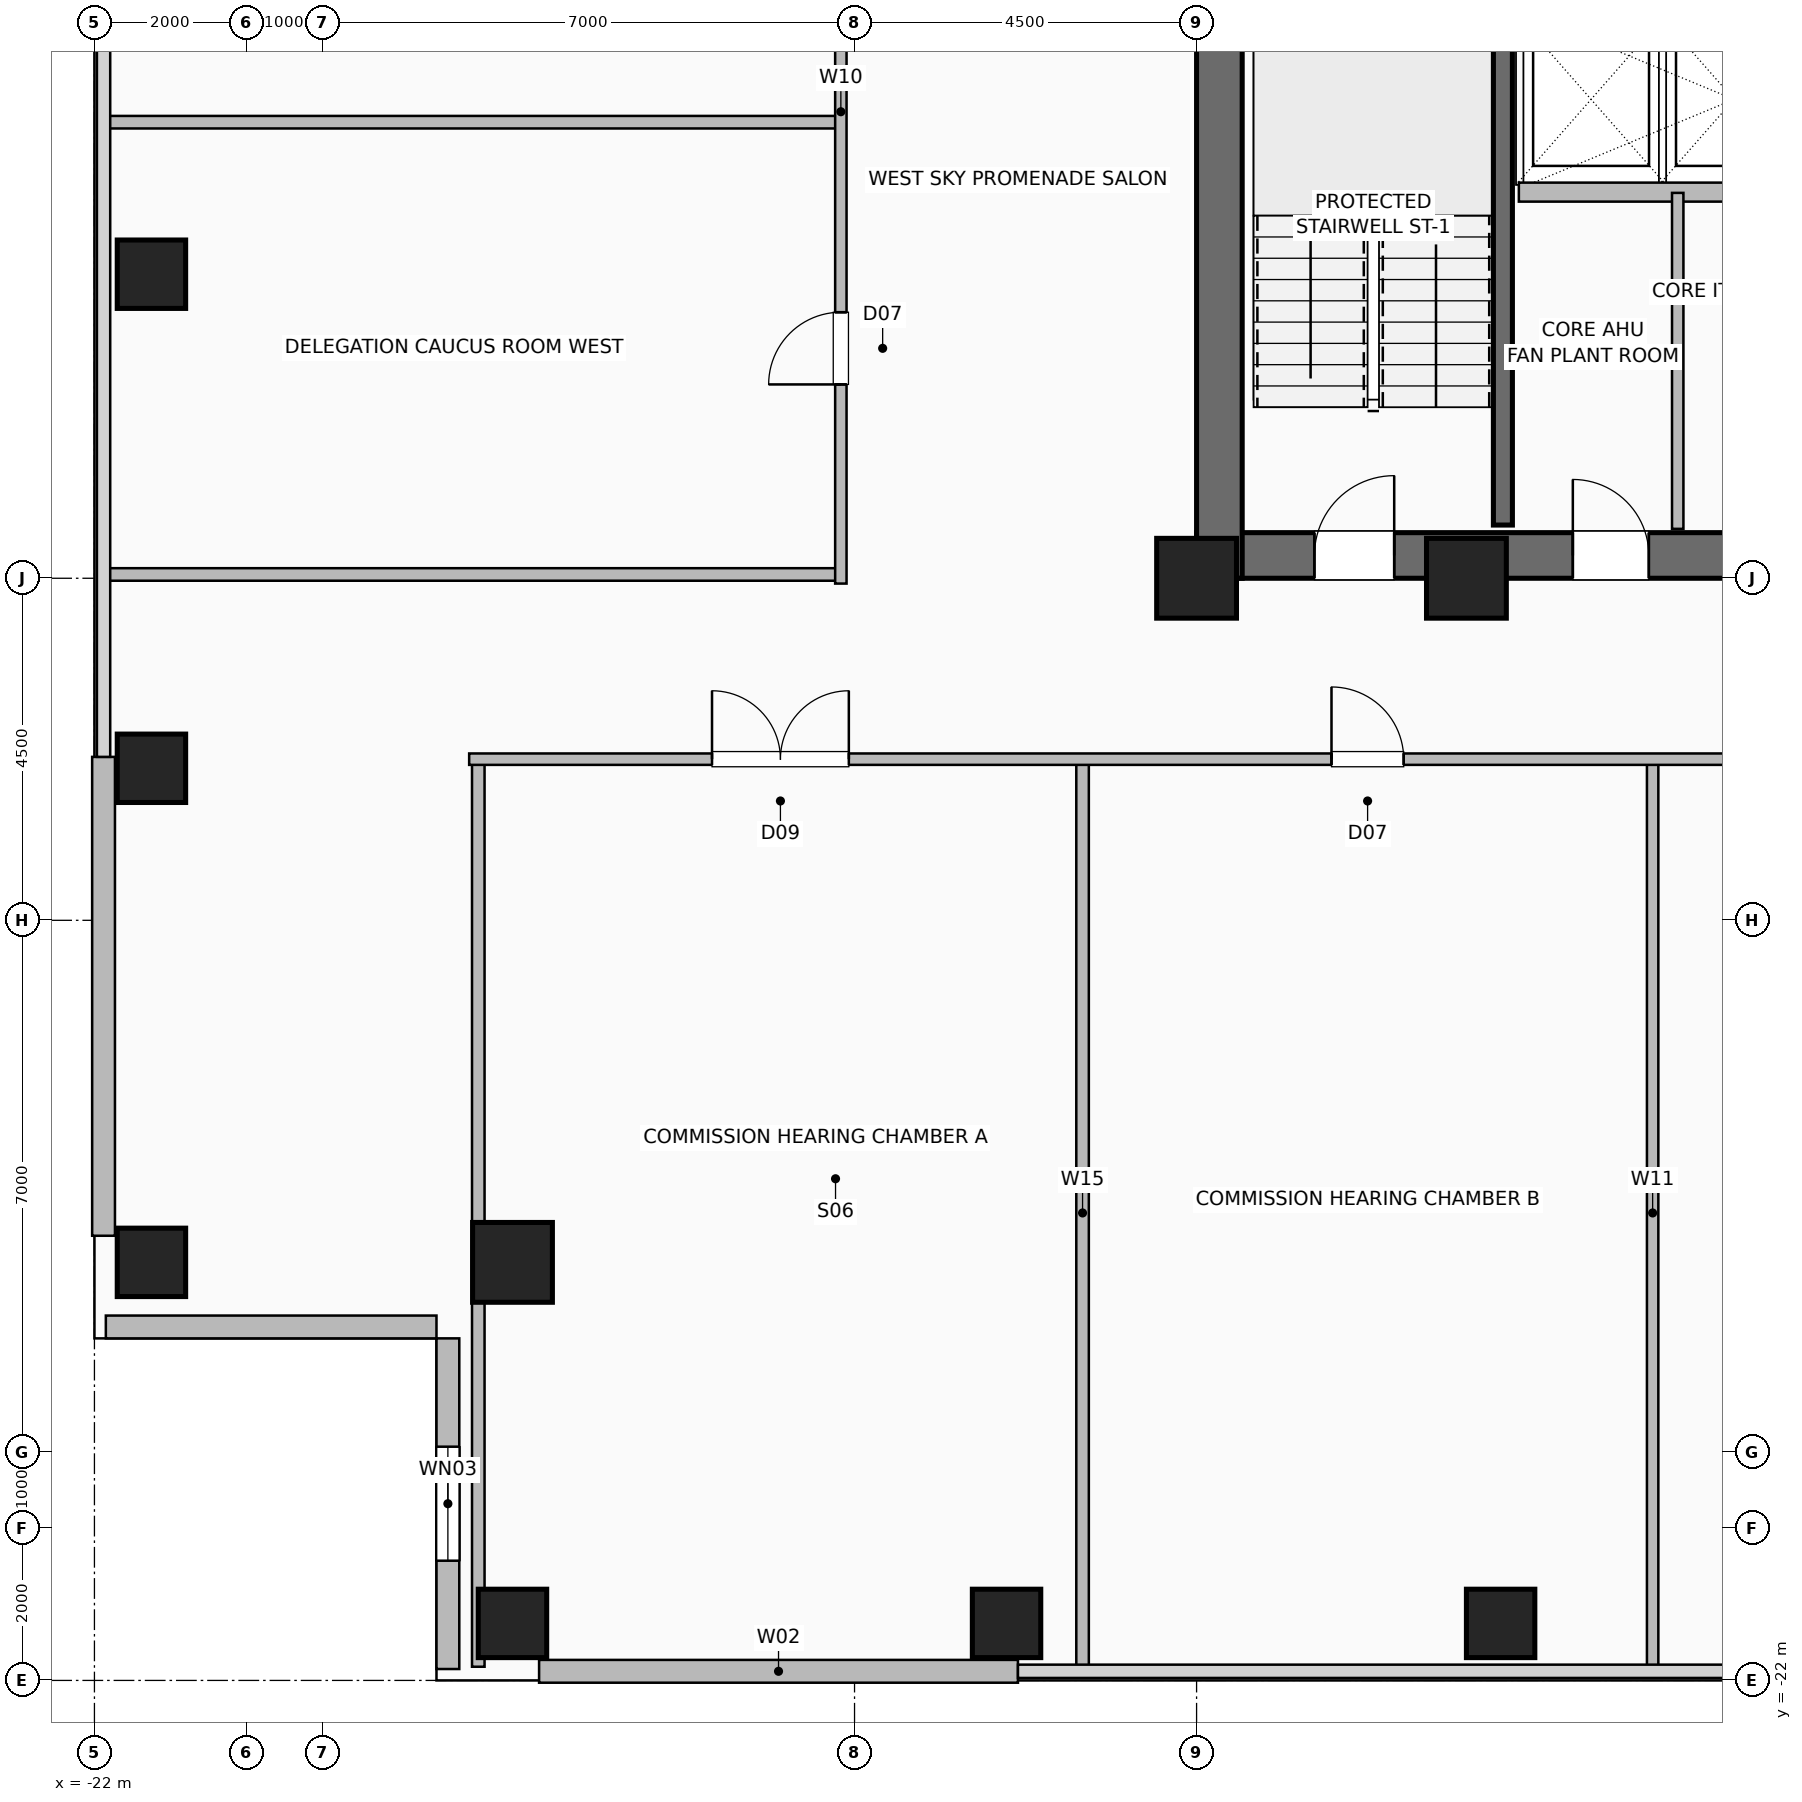
"""IFC4 building model, lengths in metres.
Left out: names, types, materials, properties, quantities, classifications, styles, units other than length and angle.
Written with IfcOpenShell. Run it as: python <this file> out.ifc"""

import sys

from ifc_helpers import new_model, si_unit, direction, frame, frame_2d, origin, origin_2d, place, context, subcontext, project, spatial, rectangle, hollow_rectangle, extrude, element, fill, save


model = new_model("IFC4")
c1 = context("Model", 3, precision=1e-05, world=origin(), true_north=direction((0.0, 1.0)))
c2 = subcontext(c1, "Body", "Model", "MODEL_VIEW")
j1 = project(units=[si_unit("LENGTHUNIT", "METRE"), si_unit("PLANEANGLEUNIT", "RADIAN")], contexts=[c1])
p1 = place(None, origin())
s1 = spatial("IfcSite", under=j1, at=p1, CompositionType="ELEMENT")
p2 = place(p1, origin())
s2 = spatial("IfcBuilding", under=s1, at=p2, CompositionType="ELEMENT")
p3 = place(p2, frame((0.0, 0.0, 101.2)))
s3 = spatial("IfcBuildingStorey", under=s2, at=p3, CompositionType="ELEMENT", Elevation=101.2)
for number, where, z_axis, x_axis in (
    (1, (-7.5, -7.5, 0.0), (0.0, 0.0, 1.0), (1.0, 0.0, 0.0)),
    (2, (-3.95, -7.5, 0.0), (0.0, 0.0, 1.0), (1.0, 0.0, 0.0)),
):
    element("IfcColumn", number, at=place(p3, frame(where, z_axis=z_axis, x_axis=x_axis)), inside=s3, PredefinedType="COLUMN", context=c2, shape_type="SweptSolid", body=[
        extrude(hollow_rectangle(XDim=1.05, YDim=1.05, WallThickness=0.05, at=origin_2d()), origin(), (0.0, 0.0, 1.0), 3.6),
    ])
for number, where, z_axis, x_axis in (
    (3, (-16.5, -21.25, 0.0), (0.0, 0.0, 1.0), (1.0, 0.0, 0.0)),
    (4, (-21.25, -16.5, 0.0), (0.0, 0.0, 1.0), (1.0, 0.0, 0.0)),
    (5, (-10.0, -21.25, 0.0), (0.0, 0.0, 1.0), (1.0, 0.0, 0.0)),
    (6, (-21.25, -10.0, 0.0), (0.0, 0.0, 1.0), (1.0, 0.0, 0.0)),
    (7, (-3.5, -21.25, 0.0), (0.0, 0.0, 1.0), (1.0, 0.0, 0.0)),
    (8, (-21.25, -3.5, 0.0), (0.0, 0.0, 1.0), (1.0, 0.0, 0.0)),
):
    element("IfcColumn", number, at=place(p3, frame(where, z_axis=z_axis, x_axis=x_axis)), inside=s3, PredefinedType="COLUMN", context=c2, shape_type="SweptSolid", body=[
        extrude(hollow_rectangle(XDim=0.9, YDim=0.9, WallThickness=0.045, at=origin_2d()), origin(), (0.0, 0.0, 1.0), 3.6),
    ])
p4 = place(p3, frame((-16.5, -16.5, 0.0), z_axis=(0.0, 0.0, 1.0), x_axis=(1.0, 0.0, 0.0)))
e9 = element("IfcColumn", 9, at=p4, inside=s3, PredefinedType="COLUMN", context=c2, shape_type="SweptSolid", body=[
    extrude(hollow_rectangle(XDim=1.05, YDim=1.05, WallThickness=0.05, at=origin_2d()), origin(), (0.0, 0.0, 1.0), 3.6),
])
for number, where, z_axis, x_axis in (
    (10, (-16.15, -21.88, 0.0), (0.0, 0.0, 1.0), (1.0, 0.0, 0.0)),
    (11, (-21.88, -16.15, 0.0), (0.0, 0.0, 1.0), (0.0, 1.0, 0.0)),
):
    element("IfcWall", number, at=place(p3, frame(where, z_axis=z_axis, x_axis=x_axis)), inside=s3, PredefinedType="SOLIDWALL", context=c2, shape_type="SweptSolid", body=[
        extrude(rectangle(XDim=6.3, YDim=0.3, at=frame_2d((3.15, 0.0))), origin(), (0.0, 0.0, 1.0), 3.36),
    ])
p5 = place(p3, frame((-17.35, -21.85, 0.0), z_axis=(0.0, 0.0, 1.0), x_axis=(0.0, 1.0, 0.0)))
e12 = element("IfcWall", 12, at=p5, inside=s3, PredefinedType="SOLIDWALL", context=c2, shape_type="SweptSolid", body=[
    extrude(rectangle(XDim=4.35, YDim=0.3, at=frame_2d((2.175, 0.0))), origin(), (0.0, 0.0, 1.0), 3.36),
])
p6 = place(p5, frame((1.425, 0.0, 0.9)))
e13 = element("IfcOpeningElement", 13, at=p6, cuts=e12, PredefinedType="OPENING", context=c2, shape_type="SweptSolid", body=[
    extrude(rectangle(XDim=1.5, YDim=1.8, at=frame_2d((0.75, 0.9))), frame((0.0, 0.16, 0.0), z_axis=(0.0, -1.0, 0.0), x_axis=(1.0, 0.0, 0.0)), (0.0, 0.0, 1.0), 0.32),
])
p7 = place(p3, frame((-21.85, -17.35, 0.0), z_axis=(0.0, 0.0, 1.0), x_axis=(1.0, 0.0, 0.0)))
e14 = element("IfcWall", 14, at=p7, inside=s3, PredefinedType="SOLIDWALL", context=c2, shape_type="SweptSolid", body=[
    extrude(rectangle(XDim=4.35, YDim=0.3, at=frame_2d((2.175, 0.0))), origin(), (0.0, 0.0, 1.0), 3.36),
])
p8 = place(p3, frame((-7.5, -7.2, 0.0), z_axis=(0.0, 0.0, 1.0), x_axis=(1.0, 0.0, 0.0)))
e15 = element("IfcWall", 15, at=p8, inside=s3, PredefinedType="SHEAR", context=c2, shape_type="SweptSolid", body=[
    extrude(rectangle(XDim=15.0, YDim=0.6, at=frame_2d((7.5, 0.0))), origin(), (0.0, 0.0, 1.0), 3.36),
])
p9 = place(p8, frame((1.55, 0.0, 0.0)))
e16 = element("IfcOpeningElement", 16, at=p9, cuts=e15, PredefinedType="OPENING", context=c2, shape_type="SweptSolid", body=[
    extrude(rectangle(XDim=1.05, YDim=2.08, at=frame_2d((0.525, 1.04))), frame((0.0, 0.31, 0.0), z_axis=(0.0, -1.0, 0.0), x_axis=(1.0, 0.0, 0.0)), (0.0, 0.0, 1.0), 0.62),
])
p10 = place(p8, frame((12.4, 0.0, 0.0)))
e17 = element("IfcOpeningElement", 17, at=p10, cuts=e15, PredefinedType="OPENING", context=c2, shape_type="SweptSolid", body=[
    extrude(rectangle(XDim=1.05, YDim=2.08, at=frame_2d((0.525, 1.04))), frame((0.0, 0.31, 0.0), z_axis=(0.0, -1.0, 0.0), x_axis=(1.0, 0.0, 0.0)), (0.0, 0.0, 1.0), 0.62),
])
p11 = place(p8, frame((4.95, 0.0, 0.0)))
e18 = element("IfcOpeningElement", 18, at=p11, cuts=e15, PredefinedType="OPENING", context=c2, shape_type="SweptSolid", body=[
    extrude(rectangle(XDim=1.0, YDim=2.08, at=frame_2d((0.5, 1.04))), frame((0.0, 0.31, 0.0), z_axis=(0.0, -1.0, 0.0), x_axis=(1.0, 0.0, 0.0)), (0.0, 0.0, 1.0), 0.62),
])
p12 = place(p8, frame((7.05, 0.0, 0.0)))
e19 = element("IfcOpeningElement", 19, at=p12, cuts=e15, PredefinedType="OPENING", context=c2, shape_type="SweptSolid", body=[
    extrude(rectangle(XDim=1.0, YDim=2.08, at=frame_2d((0.5, 1.04))), frame((0.0, 0.31, 0.0), z_axis=(0.0, -1.0, 0.0), x_axis=(1.0, 0.0, 0.0)), (0.0, 0.0, 1.0), 0.62),
])
p13 = place(p8, frame((9.15, 0.0, 0.0)))
e20 = element("IfcOpeningElement", 20, at=p13, cuts=e15, PredefinedType="OPENING", context=c2, shape_type="SweptSolid", body=[
    extrude(rectangle(XDim=1.0, YDim=2.08, at=frame_2d((0.5, 1.04))), frame((0.0, 0.31, 0.0), z_axis=(0.0, -1.0, 0.0), x_axis=(1.0, 0.0, 0.0)), (0.0, 0.0, 1.0), 0.62),
])
p14 = place(p3, frame((-7.2, -7.5, 0.0), z_axis=(0.0, 0.0, 1.0), x_axis=(0.0, 1.0, 0.0)))
e21 = element("IfcWall", 21, at=p14, inside=s3, PredefinedType="SHEAR", context=c2, shape_type="SweptSolid", body=[
    extrude(rectangle(XDim=15.0, YDim=0.6, at=frame_2d((7.5, 0.0))), origin(), (0.0, 0.0, 1.0), 3.36),
])
p15 = place(p14, frame((9.5, 0.0, 0.0)))
e22 = element("IfcOpeningElement", 22, at=p15, cuts=e21, PredefinedType="OPENING", context=c2, shape_type="SweptSolid", body=[
    extrude(rectangle(XDim=1.0, YDim=2.08, at=frame_2d((0.5, 1.04))), frame((0.0, 0.31, 0.0), z_axis=(0.0, -1.0, 0.0), x_axis=(1.0, 0.0, 0.0)), (0.0, 0.0, 1.0), 0.62),
])
p16 = place(p3, frame((-3.47, -6.8, 0.0), z_axis=(0.0, 0.0, 1.0), x_axis=(0.0, 1.0, 0.0)))
e23 = element("IfcWall", 23, at=p16, inside=s3, PredefinedType="SHEAR", context=c2, shape_type="SweptSolid", body=[
    extrude(rectangle(XDim=7.72, YDim=0.25, at=frame_2d((3.86, 0.0))), origin(), (0.0, 0.0, 1.0), 3.36),
])
p17 = place(p3, frame((-3.26, -2.42, 0.0), z_axis=(0.0, 0.0, 1.0), x_axis=(1.0, 0.0, 0.0)))
e24 = element("IfcWall", 24, at=p17, inside=s3, PredefinedType="SHEAR", context=c2, shape_type="SweptSolid", body=[
    extrude(rectangle(XDim=5.64, YDim=0.25, at=frame_2d((2.82, 0.0))), origin(), (0.0, 0.0, 1.0), 3.36),
])
p18 = place(p3, frame((-1.17, -6.85, 0.0), z_axis=(0.0, 0.0, 1.0), x_axis=(0.0, 1.0, 0.0)))
e25 = element("IfcWall", 25, at=p18, inside=s3, PredefinedType="PARTITIONING", context=c2, shape_type="SweptSolid", body=[
    extrude(rectangle(XDim=4.42, YDim=0.15, at=frame_2d((2.21, 0.0))), origin(), (0.0, 0.0, 1.0), 3.36),
])
for number, where, z_axis, x_axis in (
    (26, (-16.95, -21.82, 0.0), (0.0, 0.0, 1.0), (0.0, 1.0, 0.0)),
    (27, (-9.0, -21.82, 0.0), (0.0, 0.0, 1.0), (0.0, 1.0, 0.0)),
):
    element("IfcWall", number, at=place(p3, frame(where, z_axis=z_axis, x_axis=x_axis)), inside=s3, PredefinedType="PLUMBINGWALL", context=c2, shape_type="SweptSolid", body=[
        extrude(rectangle(XDim=11.94, YDim=0.165, at=frame_2d((5.97, 0.0))), origin(), (0.0, 0.0, 1.0), 3.36),
    ])
p19 = place(p3, frame((-1.5, -21.82, 0.0), z_axis=(0.0, 0.0, 1.0), x_axis=(0.0, 1.0, 0.0)))
e28 = element("IfcWall", 28, at=p19, inside=s3, PredefinedType="PARTITIONING", context=c2, shape_type="SweptSolid", body=[
    extrude(rectangle(XDim=11.94, YDim=0.15, at=frame_2d((5.97, 0.0))), origin(), (0.0, 0.0, 1.0), 3.36),
])
p20 = place(p3, frame((-17.07, -9.88, 0.0), z_axis=(0.0, 0.0, 1.0), x_axis=(1.0, 0.0, 0.0)))
e29 = element("IfcWall", 29, at=p20, inside=s3, PredefinedType="PARTITIONING", context=c2, shape_type="SweptSolid", body=[
    extrude(rectangle(XDim=34.14, YDim=0.15, at=frame_2d((17.07, 0.0))), origin(), (0.0, 0.0, 1.0), 3.36),
])
p21 = place(p20, frame((3.195, 0.0, 0.0)))
e30 = element("IfcOpeningElement", 30, at=p21, cuts=e29, PredefinedType="OPENING", context=c2, shape_type="SweptSolid", body=[
    extrude(rectangle(XDim=1.8, YDim=2.08, at=frame_2d((0.9, 1.04))), frame((0.0, 0.085, 0.0), z_axis=(0.0, -1.0, 0.0), x_axis=(1.0, 0.0, 0.0)), (0.0, 0.0, 1.0), 0.17),
])
p22 = place(p20, frame((11.345, 0.0, 0.0)))
e31 = element("IfcOpeningElement", 31, at=p22, cuts=e29, PredefinedType="OPENING", context=c2, shape_type="SweptSolid", body=[
    extrude(rectangle(XDim=0.95, YDim=2.06, at=frame_2d((0.475, 1.03))), frame((0.0, 0.085, 0.0), z_axis=(0.0, -1.0, 0.0), x_axis=(1.0, 0.0, 0.0)), (0.0, 0.0, 1.0), 0.17),
])
p23 = place(p20, frame((22.595, 0.0, 0.0)))
e32 = element("IfcOpeningElement", 32, at=p23, cuts=e29, PredefinedType="OPENING", context=c2, shape_type="SweptSolid", body=[
    extrude(rectangle(XDim=0.95, YDim=2.06, at=frame_2d((0.475, 1.03))), frame((0.0, 0.085, 0.0), z_axis=(0.0, -1.0, 0.0), x_axis=(1.0, 0.0, 0.0)), (0.0, 0.0, 1.0), 0.17),
])
p24 = place(p20, frame((30.925, 0.0, 0.0)))
e33 = element("IfcOpeningElement", 33, at=p24, cuts=e29, PredefinedType="OPENING", context=c2, shape_type="SweptSolid", body=[
    extrude(rectangle(XDim=0.85, YDim=2.05, at=frame_2d((0.425, 1.025))), frame((0.0, 0.085, 0.0), z_axis=(0.0, -1.0, 0.0), x_axis=(1.0, 0.0, 0.0)), (0.0, 0.0, 1.0), 0.17),
])
p25 = place(p20, frame((32.6, 0.0, 0.0)))
e34 = element("IfcOpeningElement", 34, at=p25, cuts=e29, PredefinedType="OPENING", context=c2, shape_type="SweptSolid", body=[
    extrude(rectangle(XDim=0.95, YDim=2.06, at=frame_2d((0.475, 1.03))), frame((0.0, 0.085, 0.0), z_axis=(0.0, -1.0, 0.0), x_axis=(1.0, 0.0, 0.0)), (0.0, 0.0, 1.0), 0.17),
])
for number, where, z_axis, x_axis in (
    (35, (-21.82, -7.45, 0.0), (0.0, 0.0, 1.0), (1.0, 0.0, 0.0)),
    (36, (-21.82, -1.5, 0.0), (0.0, 0.0, 1.0), (1.0, 0.0, 0.0)),
):
    element("IfcWall", number, at=place(p3, frame(where, z_axis=z_axis, x_axis=x_axis)), inside=s3, PredefinedType="PLUMBINGWALL", context=c2, shape_type="SweptSolid", body=[
        extrude(rectangle(XDim=9.64, YDim=0.165, at=frame_2d((4.82, 0.0))), origin(), (0.0, 0.0, 1.0), 3.36),
    ])
p26 = place(p3, frame((-12.18, -7.57, 0.0), z_axis=(0.0, 0.0, 1.0), x_axis=(0.0, 1.0, 0.0)))
e37 = element("IfcWall", 37, at=p26, inside=s3, PredefinedType="PARTITIONING", context=c2, shape_type="SweptSolid", body=[
    extrude(rectangle(XDim=15.14, YDim=0.15, at=frame_2d((7.57, 0.0))), origin(), (0.0, 0.0, 1.0), 3.36),
])
p27 = place(p26, frame((2.62, 0.0, 0.0)))
e38 = element("IfcOpeningElement", 38, at=p27, cuts=e37, PredefinedType="OPENING", context=c2, shape_type="SweptSolid", body=[
    extrude(rectangle(XDim=0.95, YDim=2.06, at=frame_2d((0.475, 1.03))), frame((0.0, 0.085, 0.0), z_axis=(0.0, -1.0, 0.0), x_axis=(1.0, 0.0, 0.0)), (0.0, 0.0, 1.0), 0.17),
])
p28 = place(p26, frame((8.845, 0.0, 0.0)))
e39 = element("IfcOpeningElement", 39, at=p28, cuts=e37, PredefinedType="OPENING", context=c2, shape_type="SweptSolid", body=[
    extrude(rectangle(XDim=0.95, YDim=2.06, at=frame_2d((0.475, 1.03))), frame((0.0, 0.085, 0.0), z_axis=(0.0, -1.0, 0.0), x_axis=(1.0, 0.0, 0.0)), (0.0, 0.0, 1.0), 0.17),
])
p29 = place(p26, frame((13.37, 0.0, 0.0)))
e40 = element("IfcOpeningElement", 40, at=p29, cuts=e37, PredefinedType="OPENING", context=c2, shape_type="SweptSolid", body=[
    extrude(rectangle(XDim=0.85, YDim=2.05, at=frame_2d((0.425, 1.025))), frame((0.0, 0.085, 0.0), z_axis=(0.0, -1.0, 0.0), x_axis=(1.0, 0.0, 0.0)), (0.0, 0.0, 1.0), 0.17),
])
p30 = place(p6, origin())
e41 = element("IfcWindow", 41, at=p30, inside=s3, PartitioningType="SINGLE_PANEL", PredefinedType="WINDOW", context=c2, shape_type="SweptSolid", body=[
    extrude(rectangle(XDim=1.5, YDim=1.8, at=frame_2d((0.75, 0.9))), frame((0.0, 0.03, 0.0), z_axis=(0.0, -1.0, 0.0), x_axis=(1.0, 0.0, 0.0)), (0.0, 0.0, 1.0), 0.06),
])
fill(e13, e41)
p31 = place(p9, origin())
e42 = element("IfcDoor", 42, at=p31, inside=s3, OperationType="SINGLE_SWING_RIGHT", PredefinedType="DOOR", context=c2, shape_type="SweptSolid", body=[
    extrude(rectangle(XDim=1.05, YDim=2.08, at=frame_2d((0.525, 1.04))), frame((0.0, 0.025, 0.0), z_axis=(0.0, -1.0, 0.0), x_axis=(1.0, 0.0, 0.0)), (0.0, 0.0, 1.0), 0.05),
])
fill(e16, e42)
p32 = place(p11, origin())
e43 = element("IfcDoor", 43, at=p32, inside=s3, OperationType="SINGLE_SWING_LEFT", PredefinedType="DOOR", context=c2, shape_type="SweptSolid", body=[
    extrude(rectangle(XDim=1.0, YDim=2.08, at=frame_2d((0.5, 1.04))), frame((0.0, 0.025, 0.0), z_axis=(0.0, -1.0, 0.0), x_axis=(1.0, 0.0, 0.0)), (0.0, 0.0, 1.0), 0.05),
])
fill(e18, e43)
p33 = place(p21, origin())
e44 = element("IfcDoor", 44, at=p33, inside=s3, OperationType="DOUBLE_DOOR_SINGLE_SWING", PredefinedType="DOOR", context=c2, shape_type="SweptSolid", body=[
    extrude(rectangle(XDim=1.8, YDim=2.08, at=frame_2d((0.9, 1.04))), frame((0.0, 0.025, 0.0), z_axis=(0.0, -1.0, 0.0), x_axis=(1.0, 0.0, 0.0)), (0.0, 0.0, 1.0), 0.05),
])
fill(e30, e44)
p34 = place(p22, origin())
e45 = element("IfcDoor", 45, at=p34, inside=s3, OperationType="SINGLE_SWING_LEFT", PredefinedType="DOOR", context=c2, shape_type="SweptSolid", body=[
    extrude(rectangle(XDim=0.95, YDim=2.06, at=frame_2d((0.475, 1.03))), frame((0.0, 0.025, 0.0), z_axis=(0.0, -1.0, 0.0), x_axis=(1.0, 0.0, 0.0)), (0.0, 0.0, 1.0), 0.05),
])
fill(e31, e45)
p35 = place(p27, origin())
e46 = element("IfcDoor", 46, at=p35, inside=s3, OperationType="SINGLE_SWING_LEFT", PredefinedType="DOOR", context=c2, shape_type="SweptSolid", body=[
    extrude(rectangle(XDim=0.95, YDim=2.06, at=frame_2d((0.475, 1.03))), frame((0.0, 0.025, 0.0), z_axis=(0.0, -1.0, 0.0), x_axis=(1.0, 0.0, 0.0)), (0.0, 0.0, 1.0), 0.05),
])
fill(e38, e46)
save(model, sys.argv[1])
